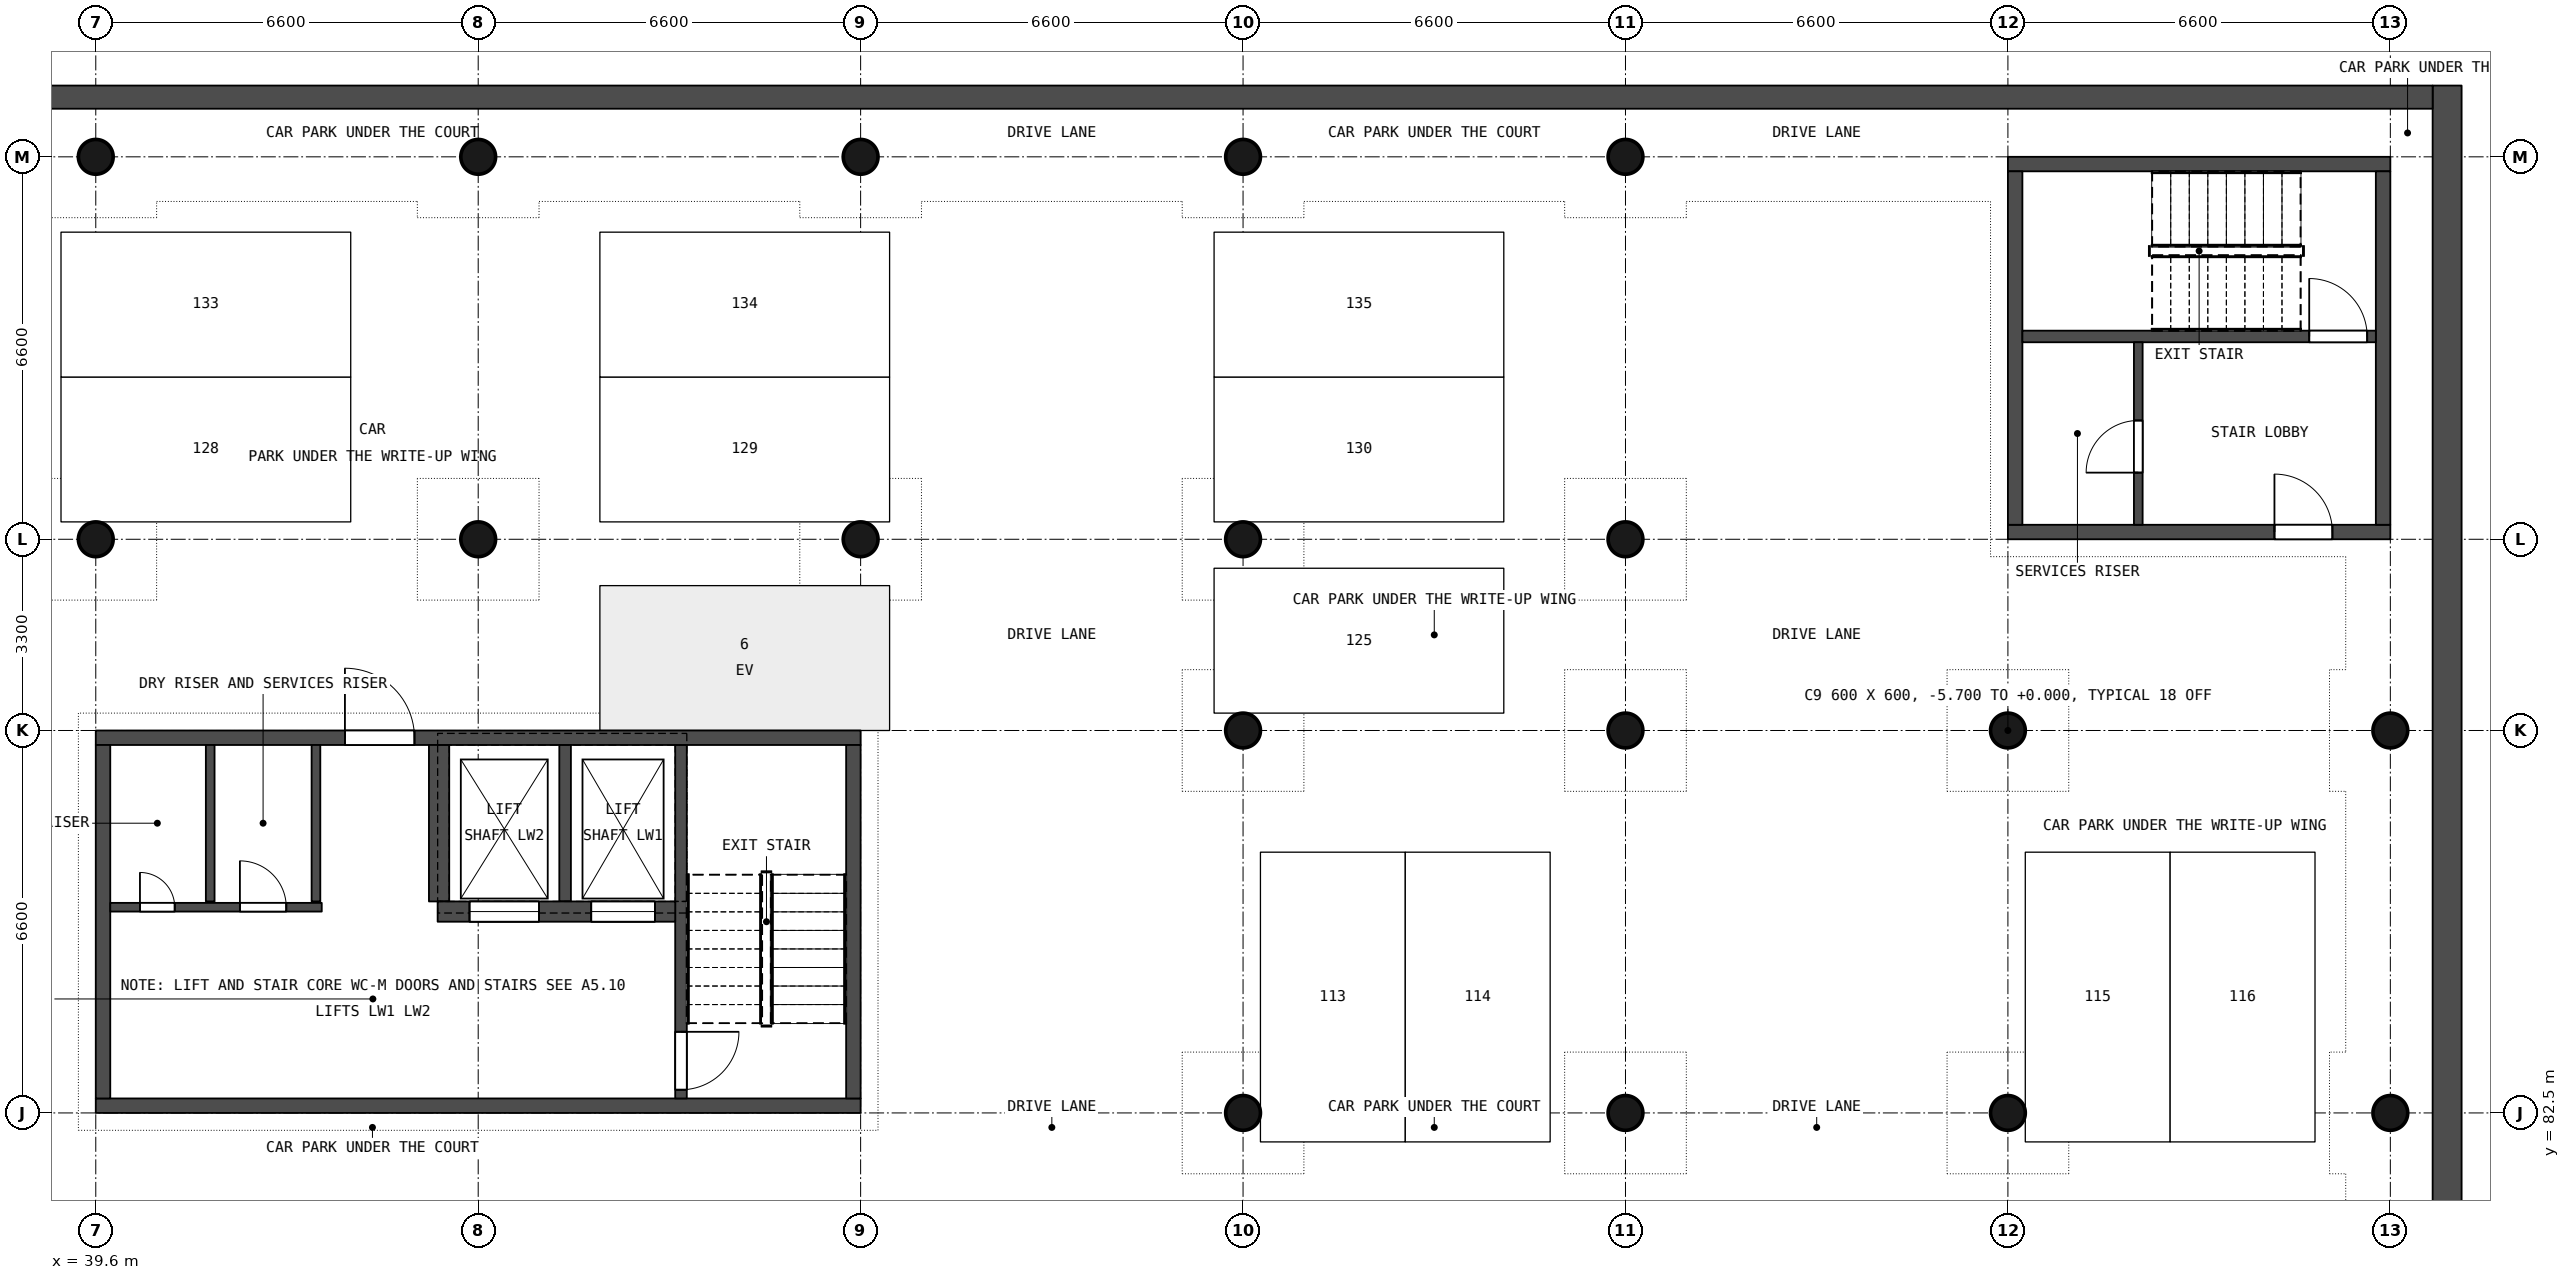
"""IFC4 building model, lengths in metres.
Left out: names, types, materials, properties, quantities, classifications, styles, units other than length and angle.
Written with IfcOpenShell. Run it as: python <this file> out.ifc"""

import sys

from ifc_helpers import new_model, si_unit, direction, frame, frame_2d, origin, origin_2d, place, context, subcontext, project, spatial, rectangle, circle, extrude, element, fill, save


model = new_model("IFC4")
c1 = context("Model", 3, precision=1e-05, world=origin(), true_north=direction((0.0, 1.0)))
c2 = subcontext(c1, "Body", "Model", "MODEL_VIEW")
j1 = project(units=[si_unit("LENGTHUNIT", "METRE"), si_unit("PLANEANGLEUNIT", "RADIAN")], contexts=[c1])
p1 = place(None, origin())
s1 = spatial("IfcSite", under=j1, at=p1, CompositionType="ELEMENT")
p2 = place(p1, origin())
s2 = spatial("IfcBuilding", under=s1, at=p2, CompositionType="ELEMENT")
p3 = place(p2, frame((0.0, 0.0, -5.7)))
s3 = spatial("IfcBuildingStorey", under=s2, at=p3, CompositionType="ELEMENT", Elevation=-5.7)
for number, where, z_axis, x_axis in (
    (1, (39.6, 92.4, 0.0), (0.0, 0.0, 1.0), (1.0, 0.0, 0.0)),
    (2, (39.6, 99.0, 0.0), (0.0, 0.0, 1.0), (1.0, 0.0, 0.0)),
    (3, (46.2, 92.4, 0.0), (0.0, 0.0, 1.0), (1.0, 0.0, 0.0)),
    (4, (46.2, 99.0, 0.0), (0.0, 0.0, 1.0), (1.0, 0.0, 0.0)),
    (5, (52.8, 92.4, 0.0), (0.0, 0.0, 1.0), (1.0, 0.0, 0.0)),
    (6, (52.8, 99.0, 0.0), (0.0, 0.0, 1.0), (1.0, 0.0, 0.0)),
    (7, (59.4, 82.5, 0.0), (0.0, 0.0, 1.0), (1.0, 0.0, 0.0)),
    (8, (59.4, 89.1, 0.0), (0.0, 0.0, 1.0), (1.0, 0.0, 0.0)),
    (9, (59.4, 92.4, 0.0), (0.0, 0.0, 1.0), (1.0, 0.0, 0.0)),
    (10, (59.4, 99.0, 0.0), (0.0, 0.0, 1.0), (1.0, 0.0, 0.0)),
    (11, (66.0, 82.5, 0.0), (0.0, 0.0, 1.0), (1.0, 0.0, 0.0)),
    (12, (66.0, 89.1, 0.0), (0.0, 0.0, 1.0), (1.0, 0.0, 0.0)),
    (13, (66.0, 92.4, 0.0), (0.0, 0.0, 1.0), (1.0, 0.0, 0.0)),
    (14, (66.0, 99.0, 0.0), (0.0, 0.0, 1.0), (1.0, 0.0, 0.0)),
    (15, (72.6, 82.5, 0.0), (0.0, 0.0, 1.0), (1.0, 0.0, 0.0)),
    (16, (72.6, 89.1, 0.0), (0.0, 0.0, 1.0), (1.0, 0.0, 0.0)),
    (17, (79.2, 82.5, 0.0), (0.0, 0.0, 1.0), (1.0, 0.0, 0.0)),
    (18, (79.2, 89.1, 0.0), (0.0, 0.0, 1.0), (1.0, 0.0, 0.0)),
):
    element("IfcColumn", number, at=place(p3, frame(where, z_axis=z_axis, x_axis=x_axis)), inside=s3, PredefinedType="COLUMN", context=c2, shape_type="SweptSolid", body=[
        extrude(circle(Radius=0.3, at=origin_2d()), origin(), (0.0, 0.0, 1.0), 5.7),
    ])
p4 = place(p3, frame((52.8, 88.975, 0.0), z_axis=(0.0, 0.0, 1.0), x_axis=(-1.0, 0.0, 0.0)))
e19 = element("IfcWall", 19, at=p4, inside=s3, PredefinedType="SHEAR", context=c2, shape_type="SweptSolid", body=[
    extrude(rectangle(XDim=13.2, YDim=0.25, at=frame_2d((6.6, 0.0))), origin(), (0.0, 0.0, 1.0), 5.4),
])
p5 = place(p4, frame((7.7, 0.0, 0.0)))
e20 = element("IfcOpeningElement", 20, at=p5, cuts=e19, PredefinedType="OPENING", context=c2, shape_type="SweptSolid", body=[
    extrude(rectangle(XDim=1.2, YDim=2.1, at=frame_2d((0.6, 1.05))), frame((0.0, 0.135, 0.0), z_axis=(0.0, -1.0, 0.0), x_axis=(1.0, 0.0, 0.0)), (0.0, 0.0, 1.0), 0.27),
])
p6 = place(p3, frame((52.8, 82.625, 0.0), z_axis=(0.0, 0.0, 1.0), x_axis=(-1.0, 0.0, 0.0)))
e21 = element("IfcWall", 21, at=p6, inside=s3, PredefinedType="SHEAR", context=c2, shape_type="SweptSolid", body=[
    extrude(rectangle(XDim=13.2, YDim=0.25, at=frame_2d((6.6, 0.0))), origin(), (0.0, 0.0, 1.0), 5.4),
])
for number, where, z_axis, x_axis in (
    (22, (52.675, 88.85, 0.0), (0.0, 0.0, 1.0), (0.0, -1.0, 0.0)),
    (23, (39.725, 88.85, 0.0), (0.0, 0.0, 1.0), (0.0, -1.0, 0.0)),
):
    element("IfcWall", number, at=place(p3, frame(where, z_axis=z_axis, x_axis=x_axis)), inside=s3, PredefinedType="SHEAR", context=c2, shape_type="SweptSolid", body=[
        extrude(rectangle(XDim=6.1, YDim=0.25, at=frame_2d((3.05, 0.0))), origin(), (0.0, 0.0, 1.0), 5.4),
    ])
p7 = place(p3, frame((49.7, 88.85, 0.0), z_axis=(0.0, 0.0, 1.0), x_axis=(0.0, -1.0, 0.0)))
e24 = element("IfcWall", 24, at=p7, inside=s3, PredefinedType="SHEAR", context=c2, shape_type="SweptSolid", body=[
    extrude(rectangle(XDim=6.1, YDim=0.2, at=frame_2d((3.05, 0.0))), origin(), (0.0, 0.0, 1.0), 5.4),
])
p8 = place(p7, frame((4.95, 0.0, 0.0)))
e25 = element("IfcOpeningElement", 25, at=p8, cuts=e24, PredefinedType="OPENING", context=c2, shape_type="SweptSolid", body=[
    extrude(rectangle(XDim=1.0, YDim=2.2, at=frame_2d((0.5, 1.1))), frame((0.0, 0.11, 0.0), z_axis=(0.0, -1.0, 0.0), x_axis=(1.0, 0.0, 0.0)), (0.0, 0.0, 1.0), 0.22),
])
p9 = place(p3, frame((47.7, 88.85, 0.0), z_axis=(0.0, 0.0, 1.0), x_axis=(0.0, -1.0, 0.0)))
e26 = element("IfcWall", 26, at=p9, inside=s3, PredefinedType="SHEAR", context=c2, shape_type="SweptSolid", body=[
    extrude(rectangle(XDim=2.7, YDim=0.2, at=frame_2d((1.35, 0.0))), origin(), (0.0, 0.0, 1.0), 5.4),
])
p10 = place(p3, frame((45.525, 88.85, 0.0), z_axis=(0.0, 0.0, 1.0), x_axis=(0.0, -1.0, 0.0)))
e27 = element("IfcWall", 27, at=p10, inside=s3, PredefinedType="SHEAR", context=c2, shape_type="SweptSolid", body=[
    extrude(rectangle(XDim=2.7, YDim=0.35, at=frame_2d((1.35, 0.0))), origin(), (0.0, 0.0, 1.0), 5.4),
])
p11 = place(p3, frame((49.6, 85.975, 0.0), z_axis=(0.0, 0.0, 1.0), x_axis=(-1.0, 0.0, 0.0)))
e28 = element("IfcWall", 28, at=p11, inside=s3, PredefinedType="SHEAR", context=c2, shape_type="SweptSolid", body=[
    extrude(rectangle(XDim=4.1, YDim=0.35, at=frame_2d((2.05, 0.0))), origin(), (0.0, 0.0, 1.0), 5.4),
])
p12 = place(p11, frame((0.35, 0.0, 0.0)))
e29 = element("IfcOpeningElement", 29, at=p12, cuts=e28, PredefinedType="OPENING", context=c2, shape_type="SweptSolid", body=[
    extrude(rectangle(XDim=1.1, YDim=2.2, at=frame_2d((0.55, 1.1))), frame((0.0, 0.185, 0.0), z_axis=(0.0, -1.0, 0.0), x_axis=(1.0, 0.0, 0.0)), (0.0, 0.0, 1.0), 0.37),
])
p13 = place(p11, frame((2.35, 0.0, 0.0)))
e30 = element("IfcOpeningElement", 30, at=p13, cuts=e28, PredefinedType="OPENING", context=c2, shape_type="SweptSolid", body=[
    extrude(rectangle(XDim=1.2, YDim=2.3, at=frame_2d((0.6, 1.15))), frame((0.0, 0.185, 0.0), z_axis=(0.0, -1.0, 0.0), x_axis=(1.0, 0.0, 0.0)), (0.0, 0.0, 1.0), 0.37),
])
p14 = place(p3, frame((43.4, 88.85, 0.0), z_axis=(0.0, 0.0, 1.0), x_axis=(0.0, -1.0, 0.0)))
e31 = element("IfcWall", 31, at=p14, inside=s3, PredefinedType="SHEAR", context=c2, shape_type="SweptSolid", body=[
    extrude(rectangle(XDim=2.7, YDim=0.15, at=frame_2d((1.35, 0.0))), origin(), (0.0, 0.0, 1.0), 5.4),
])
p15 = place(p3, frame((43.5, 86.05, 0.0), z_axis=(0.0, 0.0, 1.0), x_axis=(-1.0, 0.0, 0.0)))
e32 = element("IfcWall", 32, at=p15, inside=s3, PredefinedType="SHEAR", context=c2, shape_type="SweptSolid", body=[
    extrude(rectangle(XDim=3.65, YDim=0.15, at=frame_2d((1.825, 0.0))), origin(), (0.0, 0.0, 1.0), 5.4),
])
p16 = place(p15, frame((0.613, 0.0, 0.0)))
e33 = element("IfcOpeningElement", 33, at=p16, cuts=e32, PredefinedType="OPENING", context=c2, shape_type="SweptSolid", body=[
    extrude(rectangle(XDim=0.8, YDim=2.0, at=frame_2d((0.4, 1.0))), frame((0.0, 0.085, 0.0), z_axis=(0.0, -1.0, 0.0), x_axis=(1.0, 0.0, 0.0)), (0.0, 0.0, 1.0), 0.17),
])
p17 = place(p15, frame((2.538, 0.0, 0.0)))
e34 = element("IfcOpeningElement", 34, at=p17, cuts=e32, PredefinedType="OPENING", context=c2, shape_type="SweptSolid", body=[
    extrude(rectangle(XDim=0.6, YDim=2.1, at=frame_2d((0.3, 1.05))), frame((0.0, 0.085, 0.0), z_axis=(0.0, -1.0, 0.0), x_axis=(1.0, 0.0, 0.0)), (0.0, 0.0, 1.0), 0.17),
])
p18 = place(p3, frame((41.575, 88.85, 0.0), z_axis=(0.0, 0.0, 1.0), x_axis=(0.0, -1.0, 0.0)))
e35 = element("IfcWall", 35, at=p18, inside=s3, PredefinedType="SHEAR", context=c2, shape_type="SweptSolid", body=[
    extrude(rectangle(XDim=2.7, YDim=0.15, at=frame_2d((1.35, 0.0))), origin(), (0.0, 0.0, 1.0), 5.4),
])
for number, where, z_axis, x_axis in (
    (36, (45.5, 86.05, -1.2), (0.0, 0.0, 1.0), (1.0, 0.0, 0.0)),
    (37, (45.5, 88.95, -1.2), (0.0, 0.0, 1.0), (1.0, 0.0, 0.0)),
):
    element("IfcWall", number, at=place(p3, frame(where, z_axis=z_axis, x_axis=x_axis)), inside=s3, PredefinedType="SHEAR", context=c2, shape_type="SweptSolid", body=[
        extrude(rectangle(XDim=4.3, YDim=0.2, at=frame_2d((2.15, 0.0))), origin(), (0.0, 0.0, 1.0), 0.6),
    ])
for number, where, z_axis, x_axis in (
    (38, (45.6, 86.15, -1.2), (0.0, 0.0, 1.0), (0.0, 1.0, 0.0)),
    (39, (49.7, 86.15, -1.2), (0.0, 0.0, 1.0), (0.0, 1.0, 0.0)),
):
    element("IfcWall", number, at=place(p3, frame(where, z_axis=z_axis, x_axis=x_axis)), inside=s3, PredefinedType="SHEAR", context=c2, shape_type="SweptSolid", body=[
        extrude(rectangle(XDim=2.7, YDim=0.2, at=frame_2d((1.35, 0.0))), origin(), (0.0, 0.0, 1.0), 0.6),
    ])
p19 = place(p3, frame((72.6, 92.525, 0.0), z_axis=(0.0, 0.0, 1.0), x_axis=(1.0, 0.0, 0.0)))
e40 = element("IfcWall", 40, at=p19, inside=s3, PredefinedType="SHEAR", context=c2, shape_type="SweptSolid", body=[
    extrude(rectangle(XDim=6.6, YDim=0.25, at=frame_2d((3.3, 0.0))), origin(), (0.0, 0.0, 1.0), 5.4),
])
p20 = place(p19, frame((4.6, 0.0, 0.0)))
e41 = element("IfcOpeningElement", 41, at=p20, cuts=e40, PredefinedType="OPENING", context=c2, shape_type="SweptSolid", body=[
    extrude(rectangle(XDim=1.0, YDim=2.1, at=frame_2d((0.5, 1.05))), frame((0.0, 0.135, 0.0), z_axis=(0.0, -1.0, 0.0), x_axis=(1.0, 0.0, 0.0)), (0.0, 0.0, 1.0), 0.27),
])
p21 = place(p3, frame((72.6, 98.875, 0.0), z_axis=(0.0, 0.0, 1.0), x_axis=(1.0, 0.0, 0.0)))
e42 = element("IfcWall", 42, at=p21, inside=s3, PredefinedType="SHEAR", context=c2, shape_type="SweptSolid", body=[
    extrude(rectangle(XDim=6.6, YDim=0.25, at=frame_2d((3.3, 0.0))), origin(), (0.0, 0.0, 1.0), 5.4),
])
for number, where, z_axis, x_axis in (
    (43, (79.075, 92.65, 0.0), (0.0, 0.0, 1.0), (0.0, 1.0, 0.0)),
    (44, (72.725, 92.65, 0.0), (0.0, 0.0, 1.0), (0.0, 1.0, 0.0)),
):
    element("IfcWall", number, at=place(p3, frame(where, z_axis=z_axis, x_axis=x_axis)), inside=s3, PredefinedType="SHEAR", context=c2, shape_type="SweptSolid", body=[
        extrude(rectangle(XDim=6.1, YDim=0.25, at=frame_2d((3.05, 0.0))), origin(), (0.0, 0.0, 1.0), 5.4),
    ])
p22 = place(p3, frame((72.85, 95.9, 0.0), z_axis=(0.0, 0.0, 1.0), x_axis=(1.0, 0.0, 0.0)))
e45 = element("IfcWall", 45, at=p22, inside=s3, PredefinedType="SHEAR", context=c2, shape_type="SweptSolid", body=[
    extrude(rectangle(XDim=6.1, YDim=0.2, at=frame_2d((3.05, 0.0))), origin(), (0.0, 0.0, 1.0), 5.4),
])
p23 = place(p22, frame((4.95, 0.0, 0.0)))
e46 = element("IfcOpeningElement", 46, at=p23, cuts=e45, PredefinedType="OPENING", context=c2, shape_type="SweptSolid", body=[
    extrude(rectangle(XDim=1.0, YDim=2.1, at=frame_2d((0.5, 1.05))), frame((0.0, 0.11, 0.0), z_axis=(0.0, -1.0, 0.0), x_axis=(1.0, 0.0, 0.0)), (0.0, 0.0, 1.0), 0.22),
])
p24 = place(p3, frame((74.85, 92.65, 0.0), z_axis=(0.0, 0.0, 1.0), x_axis=(0.0, 1.0, 0.0)))
e47 = element("IfcWall", 47, at=p24, inside=s3, PredefinedType="SHEAR", context=c2, shape_type="SweptSolid", body=[
    extrude(rectangle(XDim=3.15, YDim=0.15, at=frame_2d((1.575, 0.0))), origin(), (0.0, 0.0, 1.0), 5.4),
])
p25 = place(p24, frame((0.9, 0.0, 0.0)))
e48 = element("IfcOpeningElement", 48, at=p25, cuts=e47, PredefinedType="OPENING", context=c2, shape_type="SweptSolid", body=[
    extrude(rectangle(XDim=0.9, YDim=2.1, at=frame_2d((0.45, 1.05))), frame((0.0, 0.085, 0.0), z_axis=(0.0, -1.0, 0.0), x_axis=(1.0, 0.0, 0.0)), (0.0, 0.0, 1.0), 0.17),
])
p26 = place(p3, frame((80.18, -9.03, 0.0), z_axis=(0.0, 0.0, 1.0), x_axis=(0.0, 1.0, 0.0)))
e49 = element("IfcWall", 49, at=p26, inside=s3, PredefinedType="SOLIDWALL", context=c2, shape_type="SweptSolid", body=[
    extrude(rectangle(XDim=109.26, YDim=0.5, at=frame_2d((54.63, 0.0))), origin(), (0.0, 0.0, 1.0), 5.2),
])
p27 = place(p3, frame((-6.18, 100.03, 0.0), z_axis=(0.0, 0.0, 1.0), x_axis=(1.0, 0.0, 0.0)))
e50 = element("IfcWall", 50, at=p27, inside=s3, PredefinedType="SOLIDWALL", context=c2, shape_type="SweptSolid", body=[
    extrude(rectangle(XDim=86.11, YDim=0.4, at=frame_2d((43.055, 0.0))), origin(), (0.0, 0.0, 1.0), 5.2),
])
p28 = place(p5, origin())
e51 = element("IfcDoor", 51, at=p28, inside=s3, OperationType="SINGLE_SWING_RIGHT", PredefinedType="DOOR", context=c2, shape_type="SweptSolid", body=[
    extrude(rectangle(XDim=1.2, YDim=2.1, at=frame_2d((0.6, 1.05))), frame((0.0, 0.025, 0.0), z_axis=(0.0, -1.0, 0.0), x_axis=(1.0, 0.0, 0.0)), (0.0, 0.0, 1.0), 0.05),
])
fill(e20, e51)
p29 = place(p16, origin())
e52 = element("IfcDoor", 52, at=p29, inside=s3, OperationType="SINGLE_SWING_RIGHT", PredefinedType="DOOR", context=c2, shape_type="SweptSolid", body=[
    extrude(rectangle(XDim=0.8, YDim=2.0, at=frame_2d((0.4, 1.0))), frame((0.0, 0.025, 0.0), z_axis=(0.0, -1.0, 0.0), x_axis=(1.0, 0.0, 0.0)), (0.0, 0.0, 1.0), 0.05),
])
fill(e33, e52)
p30 = place(p17, origin())
e53 = element("IfcDoor", 53, at=p30, inside=s3, OperationType="SINGLE_SWING_RIGHT", PredefinedType="DOOR", context=c2, shape_type="SweptSolid", body=[
    extrude(rectangle(XDim=0.6, YDim=2.1, at=frame_2d((0.3, 1.05))), frame((0.0, 0.025, 0.0), z_axis=(0.0, -1.0, 0.0), x_axis=(1.0, 0.0, 0.0)), (0.0, 0.0, 1.0), 0.05),
])
fill(e34, e53)
p31 = place(p8, origin())
e54 = element("IfcDoor", 54, at=p31, inside=s3, OperationType="SINGLE_SWING_LEFT", PredefinedType="DOOR", context=c2, shape_type="SweptSolid", body=[
    extrude(rectangle(XDim=1.0, YDim=2.2, at=frame_2d((0.5, 1.1))), frame((0.0, 0.025, 0.0), z_axis=(0.0, -1.0, 0.0), x_axis=(1.0, 0.0, 0.0)), (0.0, 0.0, 1.0), 0.05),
])
fill(e25, e54)
p32 = place(p12, origin())
e55 = element("IfcDoor", 55, at=p32, inside=s3, OperationType="DOUBLE_DOOR_SLIDING", PredefinedType="NOTDEFINED", context=c2, shape_type="SweptSolid", body=[
    extrude(rectangle(XDim=1.1, YDim=2.2, at=frame_2d((0.55, 1.1))), frame((0.0, 0.025, 0.0), z_axis=(0.0, -1.0, 0.0), x_axis=(1.0, 0.0, 0.0)), (0.0, 0.0, 1.0), 0.05),
])
fill(e29, e55)
p33 = place(p13, origin())
e56 = element("IfcDoor", 56, at=p33, inside=s3, OperationType="DOUBLE_DOOR_SLIDING", PredefinedType="NOTDEFINED", context=c2, shape_type="SweptSolid", body=[
    extrude(rectangle(XDim=1.2, YDim=2.3, at=frame_2d((0.6, 1.15))), frame((0.0, 0.025, 0.0), z_axis=(0.0, -1.0, 0.0), x_axis=(1.0, 0.0, 0.0)), (0.0, 0.0, 1.0), 0.05),
])
fill(e30, e56)
p34 = place(p25, origin())
e57 = element("IfcDoor", 57, at=p34, inside=s3, OperationType="SINGLE_SWING_LEFT", PredefinedType="DOOR", context=c2, shape_type="SweptSolid", body=[
    extrude(rectangle(XDim=0.9, YDim=2.1, at=frame_2d((0.45, 1.05))), frame((0.0, 0.025, 0.0), z_axis=(0.0, -1.0, 0.0), x_axis=(1.0, 0.0, 0.0)), (0.0, 0.0, 1.0), 0.05),
])
fill(e48, e57)
p35 = place(p20, origin())
e58 = element("IfcDoor", 58, at=p35, inside=s3, OperationType="SINGLE_SWING_LEFT", PredefinedType="DOOR", context=c2, shape_type="SweptSolid", body=[
    extrude(rectangle(XDim=1.0, YDim=2.1, at=frame_2d((0.5, 1.05))), frame((0.0, 0.025, 0.0), z_axis=(0.0, -1.0, 0.0), x_axis=(1.0, 0.0, 0.0)), (0.0, 0.0, 1.0), 0.05),
])
fill(e41, e58)
p36 = place(p23, origin())
e59 = element("IfcDoor", 59, at=p36, inside=s3, OperationType="SINGLE_SWING_LEFT", PredefinedType="DOOR", context=c2, shape_type="SweptSolid", body=[
    extrude(rectangle(XDim=1.0, YDim=2.1, at=frame_2d((0.5, 1.05))), frame((0.0, 0.025, 0.0), z_axis=(0.0, -1.0, 0.0), x_axis=(1.0, 0.0, 0.0)), (0.0, 0.0, 1.0), 0.05),
])
fill(e46, e59)
save(model, sys.argv[1])
